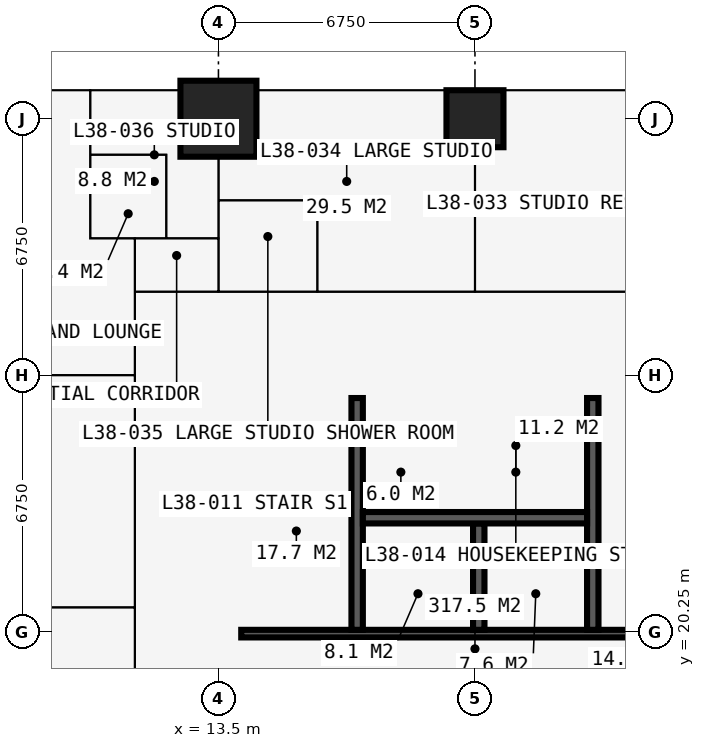
"""IFC4 building model, lengths in metres.
Left out: names, types, materials, properties, quantities, classifications, styles, units other than length and angle.
Written with IfcOpenShell. Run it as: python <this file> out.ifc"""

import sys

from ifc_helpers import new_model, si_unit, direction, frame, frame_2d, origin, origin_2d, place, context, subcontext, project, spatial, rectangle, extrude, element, fill, save


model = new_model("IFC4")
c1 = context("Model", 3, precision=1e-05, world=origin(), true_north=direction((0.0, 1.0)))
c2 = subcontext(c1, "Body", "Model", "MODEL_VIEW")
j1 = project(units=[si_unit("LENGTHUNIT", "METRE"), si_unit("PLANEANGLEUNIT", "RADIAN")], contexts=[c1])
p1 = place(None, origin())
s1 = spatial("IfcSite", under=j1, at=p1, CompositionType="ELEMENT")
p2 = place(p1, origin())
s2 = spatial("IfcBuilding", under=s1, at=p2, CompositionType="ELEMENT")
p3 = place(p2, frame((0.0, 0.0, 142.2)))
s3 = spatial("IfcBuildingStorey", under=s2, at=p3, CompositionType="ELEMENT", Elevation=142.2)
p4 = place(p3, frame((13.5, 33.75, 0.0), z_axis=(0.0, 0.0, 1.0), x_axis=(1.0, 0.0, 0.0)))
e1 = element("IfcColumn", 1, at=p4, inside=s3, PredefinedType="COLUMN", context=c2, shape_type="SweptSolid", body=[
    extrude(rectangle(XDim=2.0, YDim=2.0, at=origin_2d()), origin(), (0.0, 0.0, 1.0), 3.6),
])
p5 = place(p3, frame((20.25, 33.75, 0.0), z_axis=(0.0, 0.0, 1.0), x_axis=(1.0, 0.0, 0.0)))
e2 = element("IfcColumn", 2, at=p5, inside=s3, PredefinedType="COLUMN", context=c2, shape_type="SweptSolid", body=[
    extrude(rectangle(XDim=1.5, YDim=1.5, at=origin_2d()), origin(), (0.0, 0.0, 1.0), 3.6),
])
p6 = place(p3, frame((27.4, 27.0, 0.0), z_axis=(0.0, 0.0, 1.0), x_axis=(-1.0, 0.0, 0.0)))
e3 = element("IfcWall", 3, at=p6, inside=s3, PredefinedType="SHEAR", context=c2, shape_type="SweptSolid", body=[
    extrude(rectangle(XDim=14.3, YDim=1.2, at=frame_2d((7.15, 0.0))), origin(), (0.0, 0.0, 1.0), 3.6),
])
p7 = place(p6, frame((5.225, 0.0, 0.0)))
e4 = element("IfcOpeningElement", 4, at=p7, cuts=e3, PredefinedType="OPENING", context=c2, shape_type="SweptSolid", body=[
    extrude(rectangle(XDim=0.9, YDim=2.2, at=frame_2d((0.45, 1.1))), frame((0.0, 0.61, 0.0), z_axis=(0.0, -1.0, 0.0), x_axis=(1.0, 0.0, 0.0)), (0.0, 0.0, 1.0), 1.22),
])
p8 = place(p6, frame((8.2, 0.0, 0.0)))
e5 = element("IfcOpeningElement", 5, at=p8, cuts=e3, PredefinedType="OPENING", context=c2, shape_type="SweptSolid", body=[
    extrude(rectangle(XDim=1.0, YDim=2.2, at=frame_2d((0.5, 1.1))), frame((0.0, 0.61, 0.0), z_axis=(0.0, -1.0, 0.0), x_axis=(1.0, 0.0, 0.0)), (0.0, 0.0, 1.0), 1.22),
])
p9 = place(p3, frame((13.6, 26.4, 0.0), z_axis=(0.0, 0.0, 1.0), x_axis=(0.0, -1.0, 0.0)))
e6 = element("IfcWall", 6, at=p9, inside=s3, PredefinedType="SHEAR", context=c2, shape_type="SweptSolid", body=[
    extrude(rectangle(XDim=12.3, YDim=1.0, at=frame_2d((6.15, 0.0))), origin(), (0.0, 0.0, 1.0), 3.6),
])
p10 = place(p9, frame((7.45, 0.0, 0.0)))
e7 = element("IfcOpeningElement", 7, at=p10, cuts=e6, PredefinedType="OPENING", context=c2, shape_type="SweptSolid", body=[
    extrude(rectangle(XDim=1.2, YDim=2.2, at=frame_2d((0.6, 1.1))), frame((0.0, 0.51, 0.0), z_axis=(0.0, -1.0, 0.0), x_axis=(1.0, 0.0, 0.0)), (0.0, 0.0, 1.0), 1.02),
])
p11 = place(p3, frame((13.5, 34.5, 0.0), z_axis=(0.0, 0.0, 1.0), x_axis=(1.0, 0.0, 0.0)))
e8 = element("IfcWall", 8, at=p11, inside=s3, PredefinedType="SOLIDWALL", context=c2, shape_type="SweptSolid", body=[
    extrude(rectangle(XDim=6.75, YDim=0.15, at=frame_2d((3.375, 0.0))), origin(), (0.0, 0.0, 1.0), 3.375),
])
p12 = place(p11, frame((1.129, 0.0, 0.0)))
e9 = element("IfcOpeningElement", 9, at=p12, cuts=e8, PredefinedType="OPENING", context=c2, shape_type="SweptSolid", body=[
    extrude(rectangle(XDim=1.0, YDim=2.2, at=frame_2d((0.5, 1.1))), frame((0.0, 0.085, 0.0), z_axis=(0.0, -1.0, 0.0), x_axis=(1.0, 0.0, 0.0)), (0.0, 0.0, 1.0), 0.17),
])
p13 = place(p11, frame((2.258, 0.0, 0.9)))
e10 = element("IfcOpeningElement", 10, at=p13, cuts=e8, PredefinedType="OPENING", context=c2, shape_type="SweptSolid", body=[
    extrude(rectangle(XDim=0.9, YDim=1.8, at=frame_2d((0.45, 0.9))), frame((0.0, 0.085, 0.0), z_axis=(0.0, -1.0, 0.0), x_axis=(1.0, 0.0, 0.0)), (0.0, 0.0, 1.0), 0.17),
])
p14 = place(p11, frame((4.887, 0.0, 0.0)))
e11 = element("IfcOpeningElement", 11, at=p14, cuts=e8, PredefinedType="OPENING", context=c2, shape_type="SweptSolid", body=[
    extrude(rectangle(XDim=1.0, YDim=2.2, at=frame_2d((0.5, 1.1))), frame((0.0, 0.085, 0.0), z_axis=(0.0, -1.0, 0.0), x_axis=(1.0, 0.0, 0.0)), (0.0, 0.0, 1.0), 0.17),
])
p15 = place(p11, frame((3.575, 0.0, 0.9)))
e12 = element("IfcOpeningElement", 12, at=p15, cuts=e8, PredefinedType="OPENING", context=c2, shape_type="SweptSolid", body=[
    extrude(rectangle(XDim=1.2, YDim=1.8, at=frame_2d((0.6, 0.9))), frame((0.0, 0.085, 0.0), z_axis=(0.0, -1.0, 0.0), x_axis=(1.0, 0.0, 0.0)), (0.0, 0.0, 1.0), 0.17),
])
p16 = place(p3, frame((16.875, 34.6, 0.0), z_axis=(0.0, 0.0, 1.0), x_axis=(0.0, 1.0, 0.0)))
e13 = element("IfcWall", 13, at=p16, inside=s3, PredefinedType="USERDEFINED", context=c2, shape_type="SweptSolid", body=[
    extrude(rectangle(XDim=2.2, YDim=1.0, at=frame_2d((1.1, 0.0))), origin(), (0.0, 0.0, 1.0), 0.9),
])
p17 = place(p3, frame((14.1, 20.2, 0.0), z_axis=(0.0, 0.0, 1.0), x_axis=(1.0, 0.0, 0.0)))
e14 = element("IfcWall", 14, at=p17, inside=s3, PredefinedType="SHEAR", context=c2, shape_type="SweptSolid", body=[
    extrude(rectangle(XDim=12.3, YDim=0.2, at=frame_2d((6.15, 0.0))), origin(), (0.0, 0.0, 1.0), 3.6),
])
p18 = place(p17, frame((4.56, 0.0, 0.0)))
e15 = element("IfcOpeningElement", 15, at=p18, cuts=e14, PredefinedType="OPENING", context=c2, shape_type="SweptSolid", body=[
    extrude(rectangle(XDim=1.1, YDim=2.2, at=frame_2d((0.55, 1.1))), frame((0.0, 0.11, 0.0), z_axis=(0.0, -1.0, 0.0), x_axis=(1.0, 0.0, 0.0)), (0.0, 0.0, 1.0), 0.22),
])
p19 = place(p17, frame((6.7, 0.0, 0.0)))
e16 = element("IfcOpeningElement", 16, at=p19, cuts=e14, PredefinedType="OPENING", context=c2, shape_type="SweptSolid", body=[
    extrude(rectangle(XDim=1.1, YDim=2.2, at=frame_2d((0.55, 1.1))), frame((0.0, 0.11, 0.0), z_axis=(0.0, -1.0, 0.0), x_axis=(1.0, 0.0, 0.0)), (0.0, 0.0, 1.0), 0.22),
])
p20 = place(p17, frame((0.35, 0.0, 0.0)))
e17 = element("IfcOpeningElement", 17, at=p20, cuts=e14, PredefinedType="OPENING", context=c2, shape_type="SweptSolid", body=[
    extrude(rectangle(XDim=1.1, YDim=2.2, at=frame_2d((0.55, 1.1))), frame((0.0, 0.11, 0.0), z_axis=(0.0, -1.0, 0.0), x_axis=(1.0, 0.0, 0.0)), (0.0, 0.0, 1.0), 0.22),
])
p21 = place(p17, frame((9.75, 0.0, 0.0)))
e18 = element("IfcOpeningElement", 18, at=p21, cuts=e14, PredefinedType="OPENING", context=c2, shape_type="SweptSolid", body=[
    extrude(rectangle(XDim=1.1, YDim=2.2, at=frame_2d((0.55, 1.1))), frame((0.0, 0.11, 0.0), z_axis=(0.0, -1.0, 0.0), x_axis=(1.0, 0.0, 0.0)), (0.0, 0.0, 1.0), 0.22),
])
for number, where, z_axis, x_axis in (
    (19, (17.15, 20.3, 0.0), (0.0, 0.0, 1.0), (0.0, 1.0, 0.0)),
    (20, (23.35, 20.3, 0.0), (0.0, 0.0, 1.0), (0.0, 1.0, 0.0)),
):
    element("IfcWall", number, at=place(p3, frame(where, z_axis=z_axis, x_axis=x_axis)), inside=s3, PredefinedType="SHEAR", context=c2, shape_type="SweptSolid", body=[
        extrude(rectangle(XDim=6.1, YDim=0.3, at=frame_2d((3.05, 0.0))), origin(), (0.0, 0.0, 1.0), 3.6),
    ])
p22 = place(p3, frame((20.35, 20.3, 0.0), z_axis=(0.0, 0.0, 1.0), x_axis=(0.0, 1.0, 0.0)))
e21 = element("IfcWall", 21, at=p22, inside=s3, PredefinedType="SHEAR", context=c2, shape_type="SweptSolid", body=[
    extrude(rectangle(XDim=2.8, YDim=0.3, at=frame_2d((1.4, 0.0))), origin(), (0.0, 0.0, 1.0), 3.6),
])
p23 = place(p3, frame((17.3, 23.25, 0.0), z_axis=(0.0, 0.0, 1.0), x_axis=(1.0, 0.0, 0.0)))
e22 = element("IfcWall", 22, at=p23, inside=s3, PredefinedType="SHEAR", context=c2, shape_type="SweptSolid", body=[
    extrude(rectangle(XDim=5.9, YDim=0.3, at=frame_2d((2.95, 0.0))), origin(), (0.0, 0.0, 1.0), 3.6),
])
p24 = place(p3, frame((18.185, 16.6, 0.0), z_axis=(0.0, 0.0, 1.0), x_axis=(0.0, 1.0, 0.0)))
e23 = element("IfcWall", 23, at=p24, inside=s3, PredefinedType="PARTITIONING", context=c2, shape_type="SweptSolid", body=[
    extrude(rectangle(XDim=3.5, YDim=0.15, at=frame_2d((1.75, 0.0))), origin(), (0.0, 0.0, 1.0), 3.375),
])
p25 = place(p24, frame((1.15, 0.0, 0.0)))
e24 = element("IfcOpeningElement", 24, at=p25, cuts=e23, PredefinedType="OPENING", context=c2, shape_type="SweptSolid", body=[
    extrude(rectangle(XDim=1.2, YDim=2.2, at=frame_2d((0.6, 1.1))), frame((0.0, 0.085, 0.0), z_axis=(0.0, -1.0, 0.0), x_axis=(1.0, 0.0, 0.0)), (0.0, 0.0, 1.0), 0.17),
])
p26 = place(p3, frame((22.315, 16.6, 0.0), z_axis=(0.0, 0.0, 1.0), x_axis=(0.0, 1.0, 0.0)))
e25 = element("IfcWall", 25, at=p26, inside=s3, PredefinedType="PARTITIONING", context=c2, shape_type="SweptSolid", body=[
    extrude(rectangle(XDim=3.5, YDim=0.15, at=frame_2d((1.75, 0.0))), origin(), (0.0, 0.0, 1.0), 3.375),
])
p27 = place(p26, frame((1.15, 0.0, 0.0)))
e26 = element("IfcOpeningElement", 26, at=p27, cuts=e25, PredefinedType="OPENING", context=c2, shape_type="SweptSolid", body=[
    extrude(rectangle(XDim=1.2, YDim=2.2, at=frame_2d((0.6, 1.1))), frame((0.0, 0.085, 0.0), z_axis=(0.0, -1.0, 0.0), x_axis=(1.0, 0.0, 0.0)), (0.0, 0.0, 1.0), 0.17),
])
p28 = place(p3, frame((19.375, 23.4, 0.0), z_axis=(0.0, 0.0, 1.0), x_axis=(0.0, 1.0, 0.0)))
e27 = element("IfcWall", 27, at=p28, inside=s3, PredefinedType="PARTITIONING", context=c2, shape_type="SweptSolid", body=[
    extrude(rectangle(XDim=3.0, YDim=0.15, at=frame_2d((1.5, 0.0))), origin(), (0.0, 0.0, 1.0), 3.375),
])
p29 = place(p3, frame((-0.734, 27.0, 0.0), z_axis=(0.0, 0.0, 1.0), x_axis=(1.0, 0.0, 0.0)))
e28 = element("IfcWall", 28, at=p29, inside=s3, PredefinedType="PARTITIONING", context=c2, shape_type="SweptSolid", body=[
    extrude(rectangle(XDim=12.034, YDim=0.15, at=frame_2d((6.017, 0.0))), origin(), (0.0, 0.0, 1.0), 2.806),
])
p30 = place(p3, frame((4.85, 20.887, 0.0), z_axis=(0.0, 0.0, 1.0), x_axis=(1.0, 0.0, 0.0)))
e29 = element("IfcWall", 29, at=p30, inside=s3, PredefinedType="PARTITIONING", context=c2, shape_type="SweptSolid", body=[
    extrude(rectangle(XDim=6.45, YDim=0.15, at=frame_2d((3.225, 0.0))), origin(), (0.0, 0.0, 1.0), 3.375),
])
p31 = place(p3, frame((10.125, 30.6, 0.0), z_axis=(0.0, 0.0, 1.0), x_axis=(0.0, 1.0, 0.0)))
e30 = element("IfcWall", 30, at=p31, inside=s3, PredefinedType="PARTITIONING", context=c2, shape_type="SweptSolid", body=[
    extrude(rectangle(XDim=3.884, YDim=0.1, at=frame_2d((1.942, 0.0))), origin(), (0.0, 0.0, 1.0), 3.375),
])
p32 = place(p3, frame((10.125, 30.6, 0.0), z_axis=(0.0, 0.0, 1.0), x_axis=(1.0, 0.0, 0.0)))
e31 = element("IfcWall", 31, at=p32, inside=s3, PredefinedType="PARTITIONING", context=c2, shape_type="SweptSolid", body=[
    extrude(rectangle(XDim=3.375, YDim=0.1, at=frame_2d((1.688, 0.0))), origin(), (0.0, 0.0, 1.0), 3.375),
])
p33 = place(p32, frame((2.2, 0.0, 0.0)))
e32 = element("IfcOpeningElement", 32, at=p33, cuts=e31, PredefinedType="OPENING", context=c2, shape_type="SweptSolid", body=[
    extrude(rectangle(XDim=0.95, YDim=2.2, at=frame_2d((0.475, 1.1))), frame((0.0, 0.06, 0.0), z_axis=(0.0, -1.0, 0.0), x_axis=(1.0, 0.0, 0.0)), (0.0, 0.0, 1.0), 0.12),
])
p34 = place(p3, frame((10.125, 32.8, 0.0), z_axis=(0.0, 0.0, 1.0), x_axis=(1.0, 0.0, 0.0)))
e33 = element("IfcWall", 33, at=p34, inside=s3, PredefinedType="PARTITIONING", context=c2, shape_type="SweptSolid", body=[
    extrude(rectangle(XDim=2.0, YDim=0.1, at=frame_2d((1.0, 0.0))), origin(), (0.0, 0.0, 1.0), 3.375),
])
p35 = place(p3, frame((11.3, 11.3, 0.0), z_axis=(0.0, 0.0, 1.0), x_axis=(0.0, 1.0, 0.0)))
e34 = element("IfcWall", 34, at=p35, inside=s3, PredefinedType="PARTITIONING", context=c2, shape_type="SweptSolid", body=[
    extrude(rectangle(XDim=19.3, YDim=0.15, at=frame_2d((9.65, 0.0))), origin(), (0.0, 0.0, 1.0), 3.375),
])
p36 = place(p35, frame((18.1, 0.0, 0.0)))
e35 = element("IfcOpeningElement", 35, at=p36, cuts=e34, PredefinedType="OPENING", context=c2, shape_type="SweptSolid", body=[
    extrude(rectangle(XDim=1.0, YDim=2.2, at=frame_2d((0.5, 1.1))), frame((0.0, 0.085, 0.0), z_axis=(0.0, -1.0, 0.0), x_axis=(1.0, 0.0, 0.0)), (0.0, 0.0, 1.0), 0.17),
])
p37 = place(p35, frame((12.137, 0.0, 0.0)))
e36 = element("IfcOpeningElement", 36, at=p37, cuts=e34, PredefinedType="OPENING", context=c2, shape_type="SweptSolid", body=[
    extrude(rectangle(XDim=1.0, YDim=2.2, at=frame_2d((0.5, 1.1))), frame((0.0, 0.085, 0.0), z_axis=(0.0, -1.0, 0.0), x_axis=(1.0, 0.0, 0.0)), (0.0, 0.0, 1.0), 0.17),
])
p38 = place(p3, frame((11.3, 29.2, 0.0), z_axis=(0.0, 0.0, 1.0), x_axis=(1.0, 0.0, 0.0)))
e37 = element("IfcWall", 37, at=p38, inside=s3, PredefinedType="PARTITIONING", context=c2, shape_type="SweptSolid", body=[
    extrude(rectangle(XDim=19.809, YDim=0.15, at=frame_2d((9.904, 0.0))), origin(), (0.0, 0.0, 1.0), 3.375),
])
p39 = place(p38, frame((12.9, 0.0, 0.0)))
e38 = element("IfcOpeningElement", 38, at=p39, cuts=e37, PredefinedType="OPENING", context=c2, shape_type="SweptSolid", body=[
    extrude(rectangle(XDim=1.0, YDim=2.2, at=frame_2d((0.5, 1.1))), frame((0.0, 0.085, 0.0), z_axis=(0.0, -1.0, 0.0), x_axis=(1.0, 0.0, 0.0)), (0.0, 0.0, 1.0), 0.17),
])
p40 = place(p38, frame((6.4, 0.0, 0.0)))
e39 = element("IfcOpeningElement", 39, at=p40, cuts=e37, PredefinedType="OPENING", context=c2, shape_type="SweptSolid", body=[
    extrude(rectangle(XDim=0.95, YDim=2.2, at=frame_2d((0.475, 1.1))), frame((0.0, 0.085, 0.0), z_axis=(0.0, -1.0, 0.0), x_axis=(1.0, 0.0, 0.0)), (0.0, 0.0, 1.0), 0.17),
])
p41 = place(p38, frame((0.6, 0.0, 0.0)))
e40 = element("IfcOpeningElement", 40, at=p41, cuts=e37, PredefinedType="OPENING", context=c2, shape_type="SweptSolid", body=[
    extrude(rectangle(XDim=1.0, YDim=2.2, at=frame_2d((0.5, 1.1))), frame((0.0, 0.085, 0.0), z_axis=(0.0, -1.0, 0.0), x_axis=(1.0, 0.0, 0.0)), (0.0, 0.0, 1.0), 0.17),
])
p42 = place(p3, frame((12.125, 30.6, 0.0), z_axis=(0.0, 0.0, 1.0), x_axis=(0.0, 1.0, 0.0)))
e41 = element("IfcWall", 41, at=p42, inside=s3, PredefinedType="PARTITIONING", context=c2, shape_type="SweptSolid", body=[
    extrude(rectangle(XDim=2.2, YDim=0.1, at=frame_2d((1.1, 0.0))), origin(), (0.0, 0.0, 1.0), 3.375),
])
p43 = place(p42, frame((0.65, 0.0, 0.0)))
e42 = element("IfcOpeningElement", 42, at=p43, cuts=e41, PredefinedType="OPENING", context=c2, shape_type="SweptSolid", body=[
    extrude(rectangle(XDim=0.9, YDim=2.2, at=frame_2d((0.45, 1.1))), frame((0.0, 0.06, 0.0), z_axis=(0.0, -1.0, 0.0), x_axis=(1.0, 0.0, 0.0)), (0.0, 0.0, 1.0), 0.12),
])
p44 = place(p3, frame((13.5, 29.2, 0.0), z_axis=(0.0, 0.0, 1.0), x_axis=(0.0, 1.0, 0.0)))
e43 = element("IfcWall", 43, at=p44, inside=s3, PredefinedType="PARTITIONING", context=c2, shape_type="SweptSolid", body=[
    extrude(rectangle(XDim=5.284, YDim=0.175, at=frame_2d((2.642, 0.0))), origin(), (0.0, 0.0, 1.0), 2.806),
])
p45 = place(p3, frame((13.5, 31.6, 0.0), z_axis=(0.0, 0.0, 1.0), x_axis=(1.0, 0.0, 0.0)))
e44 = element("IfcWall", 44, at=p45, inside=s3, PredefinedType="PARTITIONING", context=c2, shape_type="SweptSolid", body=[
    extrude(rectangle(XDim=2.6, YDim=0.1, at=frame_2d((1.3, 0.0))), origin(), (0.0, 0.0, 1.0), 3.375),
])
p46 = place(p45, frame((0.85, 0.0, 0.0)))
e45 = element("IfcOpeningElement", 45, at=p46, cuts=e44, PredefinedType="OPENING", context=c2, shape_type="SweptSolid", body=[
    extrude(rectangle(XDim=0.9, YDim=2.2, at=frame_2d((0.45, 1.1))), frame((0.0, 0.06, 0.0), z_axis=(0.0, -1.0, 0.0), x_axis=(1.0, 0.0, 0.0)), (0.0, 0.0, 1.0), 0.12),
])
p47 = place(p3, frame((16.1, 29.2, 0.0), z_axis=(0.0, 0.0, 1.0), x_axis=(0.0, 1.0, 0.0)))
e46 = element("IfcWall", 46, at=p47, inside=s3, PredefinedType="PARTITIONING", context=c2, shape_type="SweptSolid", body=[
    extrude(rectangle(XDim=2.4, YDim=0.1, at=frame_2d((1.2, 0.0))), origin(), (0.0, 0.0, 1.0), 3.375),
])
p48 = place(p3, frame((20.25, 29.2, 0.0), z_axis=(0.0, 0.0, 1.0), x_axis=(0.0, 1.0, 0.0)))
e47 = element("IfcWall", 47, at=p48, inside=s3, PredefinedType="PARTITIONING", context=c2, shape_type="SweptSolid", body=[
    extrude(rectangle(XDim=5.284, YDim=0.15, at=frame_2d((2.642, 0.0))), origin(), (0.0, 0.0, 1.0), 2.806),
])
p49 = place(p12, origin())
e48 = element("IfcDoor", 48, at=p49, inside=s3, OperationType="SINGLE_SWING_LEFT", PredefinedType="DOOR", context=c2, shape_type="SweptSolid", body=[
    extrude(rectangle(XDim=1.0, YDim=2.2, at=frame_2d((0.5, 1.1))), frame((0.0, 0.025, 0.0), z_axis=(0.0, -1.0, 0.0), x_axis=(1.0, 0.0, 0.0)), (0.0, 0.0, 1.0), 0.05),
])
fill(e9, e48)
p50 = place(p13, origin())
e49 = element("IfcWindow", 49, at=p50, inside=s3, PartitioningType="SINGLE_PANEL", PredefinedType="WINDOW", context=c2, shape_type="SweptSolid", body=[
    extrude(rectangle(XDim=0.9, YDim=1.8, at=frame_2d((0.45, 0.9))), frame((0.0, 0.03, 0.0), z_axis=(0.0, -1.0, 0.0), x_axis=(1.0, 0.0, 0.0)), (0.0, 0.0, 1.0), 0.06),
])
fill(e10, e49)
p51 = place(p14, origin())
e50 = element("IfcDoor", 50, at=p51, inside=s3, OperationType="SINGLE_SWING_RIGHT", PredefinedType="DOOR", context=c2, shape_type="SweptSolid", body=[
    extrude(rectangle(XDim=1.0, YDim=2.2, at=frame_2d((0.5, 1.1))), frame((0.0, 0.025, 0.0), z_axis=(0.0, -1.0, 0.0), x_axis=(1.0, 0.0, 0.0)), (0.0, 0.0, 1.0), 0.05),
])
fill(e11, e50)
p52 = place(p15, origin())
e51 = element("IfcWindow", 51, at=p52, inside=s3, PartitioningType="SINGLE_PANEL", PredefinedType="WINDOW", context=c2, shape_type="SweptSolid", body=[
    extrude(rectangle(XDim=1.2, YDim=1.8, at=frame_2d((0.6, 0.9))), frame((0.0, 0.03, 0.0), z_axis=(0.0, -1.0, 0.0), x_axis=(1.0, 0.0, 0.0)), (0.0, 0.0, 1.0), 0.06),
])
fill(e12, e51)
p53 = place(p18, origin())
e52 = element("IfcDoor", 52, at=p53, inside=s3, OperationType="DOUBLE_DOOR_SLIDING", PredefinedType="DOOR", context=c2, shape_type="SweptSolid", body=[
    extrude(rectangle(XDim=1.1, YDim=2.2, at=frame_2d((0.55, 1.1))), frame((0.0, 0.025, 0.0), z_axis=(0.0, -1.0, 0.0), x_axis=(1.0, 0.0, 0.0)), (0.0, 0.0, 1.0), 0.05),
])
fill(e15, e52)
p54 = place(p19, origin())
e53 = element("IfcDoor", 53, at=p54, inside=s3, OperationType="DOUBLE_DOOR_SLIDING", PredefinedType="DOOR", context=c2, shape_type="SweptSolid", body=[
    extrude(rectangle(XDim=1.1, YDim=2.2, at=frame_2d((0.55, 1.1))), frame((0.0, 0.025, 0.0), z_axis=(0.0, -1.0, 0.0), x_axis=(1.0, 0.0, 0.0)), (0.0, 0.0, 1.0), 0.05),
])
fill(e16, e53)
p55 = place(p7, origin())
e54 = element("IfcDoor", 54, at=p55, inside=s3, OperationType="SINGLE_SWING_LEFT", PredefinedType="DOOR", context=c2, shape_type="SweptSolid", body=[
    extrude(rectangle(XDim=0.9, YDim=2.2, at=frame_2d((0.45, 1.1))), frame((0.0, 0.4, 0.0), z_axis=(0.0, -1.0, 0.0), x_axis=(1.0, 0.0, 0.0)), (0.0, 0.0, 1.0), 0.8),
])
fill(e4, e54)
p56 = place(p8, origin())
e55 = element("IfcDoor", 55, at=p56, inside=s3, OperationType="SINGLE_SWING_LEFT", PredefinedType="DOOR", context=c2, shape_type="SweptSolid", body=[
    extrude(rectangle(XDim=1.0, YDim=2.2, at=frame_2d((0.5, 1.1))), frame((0.0, 0.025, 0.0), z_axis=(0.0, -1.0, 0.0), x_axis=(1.0, 0.0, 0.0)), (0.0, 0.0, 1.0), 0.05),
])
fill(e5, e55)
p57 = place(p20, origin())
e56 = element("IfcDoor", 56, at=p57, inside=s3, OperationType="SINGLE_SWING_LEFT", PredefinedType="DOOR", context=c2, shape_type="SweptSolid", body=[
    extrude(rectangle(XDim=1.1, YDim=2.2, at=frame_2d((0.55, 1.1))), frame((0.0, 0.025, 0.0), z_axis=(0.0, -1.0, 0.0), x_axis=(1.0, 0.0, 0.0)), (0.0, 0.0, 1.0), 0.05),
])
fill(e17, e56)
p58 = place(p21, origin())
e57 = element("IfcDoor", 57, at=p58, inside=s3, OperationType="SINGLE_SWING_LEFT", PredefinedType="DOOR", context=c2, shape_type="SweptSolid", body=[
    extrude(rectangle(XDim=1.1, YDim=2.2, at=frame_2d((0.55, 1.1))), frame((0.0, 0.025, 0.0), z_axis=(0.0, -1.0, 0.0), x_axis=(1.0, 0.0, 0.0)), (0.0, 0.0, 1.0), 0.05),
])
fill(e18, e57)
p59 = place(p40, origin())
e58 = element("IfcDoor", 58, at=p59, inside=s3, OperationType="SINGLE_SWING_LEFT", PredefinedType="DOOR", context=c2, shape_type="SweptSolid", body=[
    extrude(rectangle(XDim=0.95, YDim=2.2, at=frame_2d((0.475, 1.1))), frame((0.0, 0.025, 0.0), z_axis=(0.0, -1.0, 0.0), x_axis=(1.0, 0.0, 0.0)), (0.0, 0.0, 1.0), 0.05),
])
fill(e39, e58)
p60 = place(p46, origin())
e59 = element("IfcDoor", 59, at=p60, inside=s3, OperationType="SINGLE_SWING_RIGHT", PredefinedType="DOOR", context=c2, shape_type="SweptSolid", body=[
    extrude(rectangle(XDim=0.9, YDim=2.2, at=frame_2d((0.45, 1.1))), frame((0.0, 0.025, 0.0), z_axis=(0.0, -1.0, 0.0), x_axis=(1.0, 0.0, 0.0)), (0.0, 0.0, 1.0), 0.05),
])
fill(e45, e59)
p61 = place(p33, origin())
e60 = element("IfcDoor", 60, at=p61, inside=s3, OperationType="SINGLE_SWING_LEFT", PredefinedType="DOOR", context=c2, shape_type="SweptSolid", body=[
    extrude(rectangle(XDim=0.95, YDim=2.2, at=frame_2d((0.475, 1.1))), frame((0.0, 0.025, 0.0), z_axis=(0.0, -1.0, 0.0), x_axis=(1.0, 0.0, 0.0)), (0.0, 0.0, 1.0), 0.05),
])
fill(e32, e60)
p62 = place(p43, origin())
e61 = element("IfcDoor", 61, at=p62, inside=s3, OperationType="SINGLE_SWING_RIGHT", PredefinedType="DOOR", context=c2, shape_type="SweptSolid", body=[
    extrude(rectangle(XDim=0.9, YDim=2.2, at=frame_2d((0.45, 1.1))), frame((0.0, 0.025, 0.0), z_axis=(0.0, -1.0, 0.0), x_axis=(1.0, 0.0, 0.0)), (0.0, 0.0, 1.0), 0.05),
])
fill(e42, e61)
p63 = place(p41, origin())
e62 = element("IfcDoor", 62, at=p63, inside=s3, OperationType="SINGLE_SWING_LEFT", PredefinedType="DOOR", context=c2, shape_type="SweptSolid", body=[
    extrude(rectangle(XDim=1.0, YDim=2.2, at=frame_2d((0.5, 1.1))), frame((0.0, 0.025, 0.0), z_axis=(0.0, -1.0, 0.0), x_axis=(1.0, 0.0, 0.0)), (0.0, 0.0, 1.0), 0.05),
])
fill(e40, e62)
p64 = place(p36, origin())
e63 = element("IfcDoor", 63, at=p64, inside=s3, OperationType="SINGLE_SWING_LEFT", PredefinedType="DOOR", context=c2, shape_type="SweptSolid", body=[
    extrude(rectangle(XDim=1.0, YDim=2.2, at=frame_2d((0.5, 1.1))), frame((0.0, 0.025, 0.0), z_axis=(0.0, -1.0, 0.0), x_axis=(1.0, 0.0, 0.0)), (0.0, 0.0, 1.0), 0.05),
])
fill(e35, e63)
p65 = place(p37, origin())
e64 = element("IfcDoor", 64, at=p65, inside=s3, OperationType="SINGLE_SWING_LEFT", PredefinedType="DOOR", context=c2, shape_type="SweptSolid", body=[
    extrude(rectangle(XDim=1.0, YDim=2.2, at=frame_2d((0.5, 1.1))), frame((0.0, 0.025, 0.0), z_axis=(0.0, -1.0, 0.0), x_axis=(1.0, 0.0, 0.0)), (0.0, 0.0, 1.0), 0.05),
])
fill(e36, e64)
save(model, sys.argv[1])
